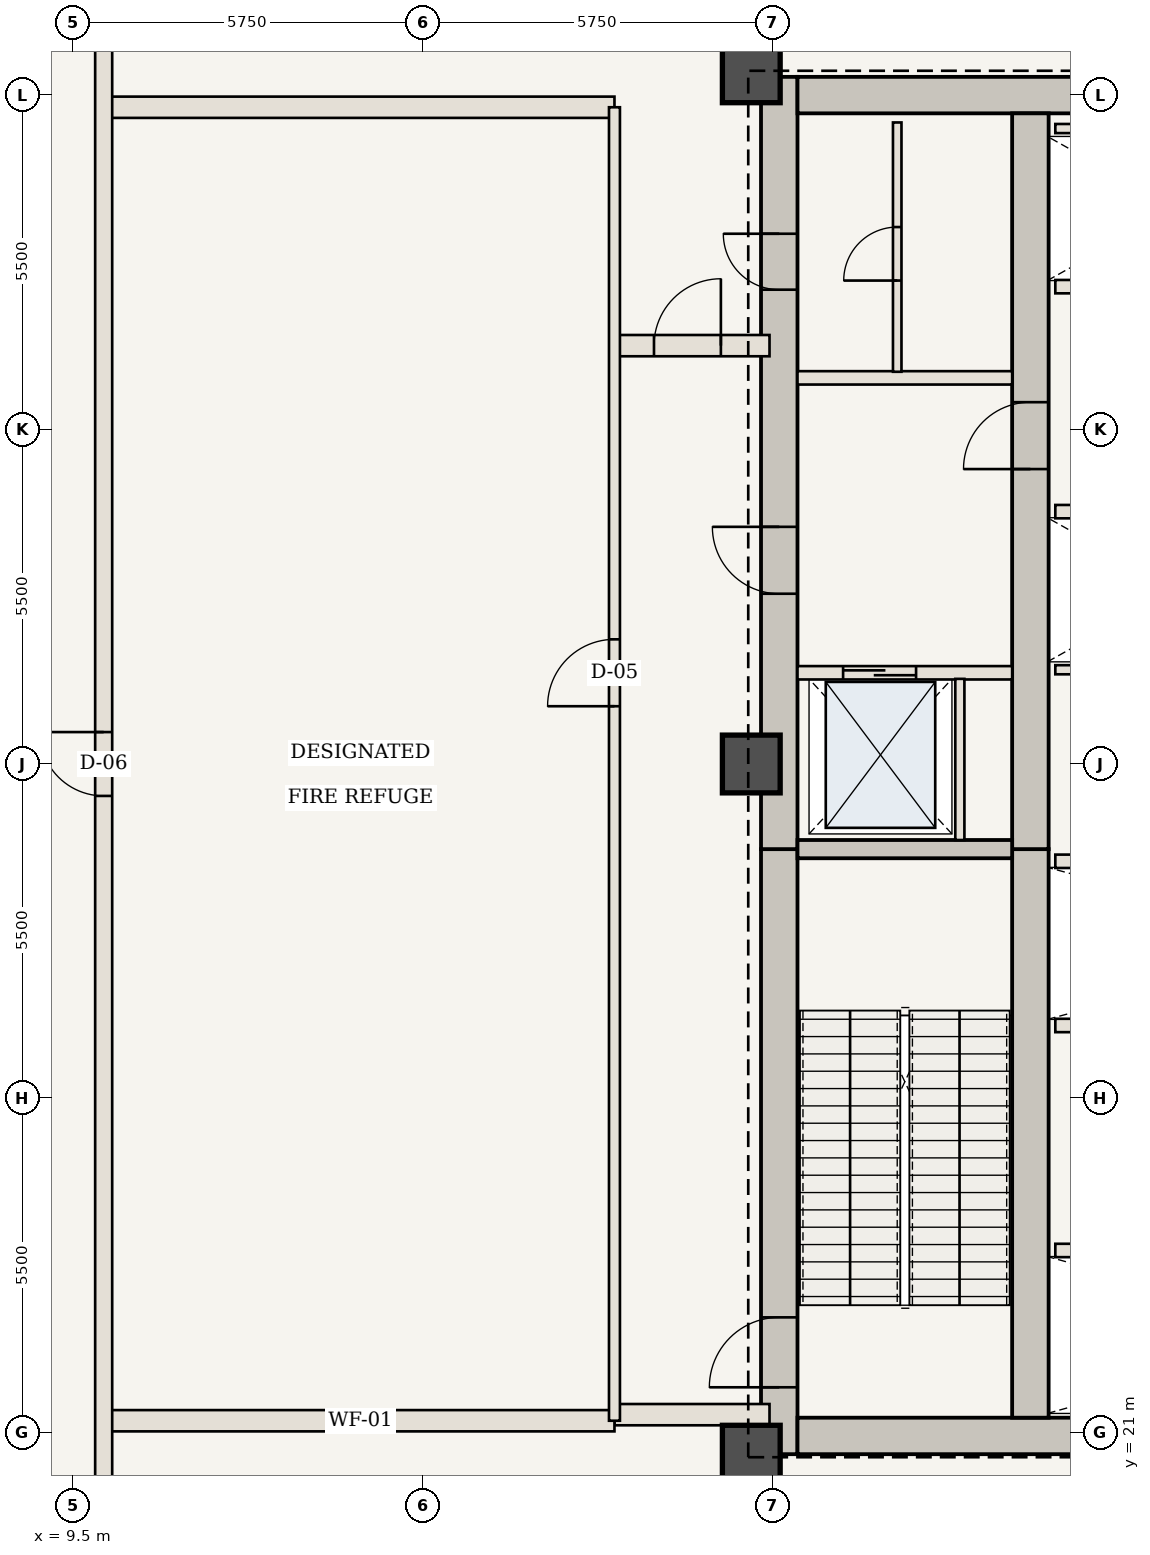
"""IFC4 building model, lengths in metres.
Left out: names, types, materials, properties, quantities, classifications, styles, units other than length and angle.
Written with IfcOpenShell. Run it as: python <this file> out.ifc"""

import sys

from ifc_helpers import new_model, si_unit, direction, frame, frame_2d, origin, origin_2d, place, context, subcontext, project, spatial, rectangle, extrude, element, fill, save


model = new_model("IFC4")
c1 = context("Model", 3, precision=1e-05, world=origin(), true_north=direction((0.0, 1.0)))
c2 = subcontext(c1, "Body", "Model", "MODEL_VIEW")
j1 = project(units=[si_unit("LENGTHUNIT", "METRE"), si_unit("PLANEANGLEUNIT", "RADIAN")], contexts=[c1])
p1 = place(None, origin())
s1 = spatial("IfcSite", under=j1, at=p1, CompositionType="ELEMENT")
p2 = place(p1, origin())
s2 = spatial("IfcBuilding", under=s1, at=p2, CompositionType="ELEMENT")
p3 = place(p2, frame((0.0, 0.0, 176.05)))
s3 = spatial("IfcBuildingStorey", under=s2, at=p3, CompositionType="ELEMENT", Elevation=176.05)
p4 = place(p3, frame((21.11, 20.65, 0.0), z_axis=(0.0, 0.0, 1.0), x_axis=(0.0, 1.0, 0.0)))
e1 = element("IfcWall", 1, at=p4, inside=s3, PredefinedType="SHEAR", context=c2, shape_type="SweptSolid", body=[
    extrude(rectangle(XDim=9.95, YDim=0.6, at=frame_2d((4.975, 0.0))), origin(), (0.0, 0.0, 1.0), 6.3),
])
p5 = place(p4, frame((1.1, 0.0, 0.0)))
e2 = element("IfcOpeningElement", 2, at=p5, cuts=e1, PredefinedType="OPENING", context=c2, shape_type="SweptSolid", body=[
    extrude(rectangle(XDim=1.15, YDim=2.15, at=frame_2d((0.575, 1.075))), frame((0.0, 0.31, 0.0), z_axis=(0.0, -1.0, 0.0), x_axis=(1.0, 0.0, 0.0)), (0.0, 0.0, 1.0), 0.62),
])
p6 = place(p3, frame((21.11, 30.6, 0.0), z_axis=(0.0, 0.0, 1.0), x_axis=(0.0, 1.0, 0.0)))
e3 = element("IfcWall", 3, at=p6, inside=s3, PredefinedType="SHEAR", context=c2, shape_type="SweptSolid", body=[
    extrude(rectangle(XDim=12.7, YDim=0.6, at=frame_2d((6.35, 0.0))), origin(), (0.0, 0.0, 1.0), 6.3),
])
p7 = place(p6, frame((4.2, 0.0, 0.0)))
e4 = element("IfcOpeningElement", 4, at=p7, cuts=e3, PredefinedType="OPENING", context=c2, shape_type="SweptSolid", body=[
    extrude(rectangle(XDim=1.1, YDim=2.15, at=frame_2d((0.55, 1.075))), frame((0.0, 0.31, 0.0), z_axis=(0.0, -1.0, 0.0), x_axis=(1.0, 0.0, 0.0)), (0.0, 0.0, 1.0), 0.62),
])
p8 = place(p6, frame((9.2, 0.0, 0.0)))
e5 = element("IfcOpeningElement", 5, at=p8, cuts=e3, PredefinedType="OPENING", context=c2, shape_type="SweptSolid", body=[
    extrude(rectangle(XDim=0.92, YDim=2.1, at=frame_2d((0.46, 1.05))), frame((0.0, 0.31, 0.0), z_axis=(0.0, -1.0, 0.0), x_axis=(1.0, 0.0, 0.0)), (0.0, 0.0, 1.0), 0.62),
])
p9 = place(p3, frame((21.41, 20.95, 0.0), z_axis=(0.0, 0.0, 1.0), x_axis=(1.0, 0.0, 0.0)))
e6 = element("IfcWall", 6, at=p9, inside=s3, PredefinedType="SHEAR", context=c2, shape_type="SweptSolid", body=[
    extrude(rectangle(XDim=13.74, YDim=0.6, at=frame_2d((6.87, 0.0))), origin(), (0.0, 0.0, 1.0), 6.3),
])
p10 = place(p3, frame((21.41, 43.0, 0.0), z_axis=(0.0, 0.0, 1.0), x_axis=(1.0, 0.0, 0.0)))
e7 = element("IfcWall", 7, at=p10, inside=s3, PredefinedType="SHEAR", context=c2, shape_type="SweptSolid", body=[
    extrude(rectangle(XDim=8.24, YDim=0.6, at=frame_2d((4.12, 0.0))), origin(), (0.0, 0.0, 1.0), 6.3),
])
p11 = place(p3, frame((25.24, 21.25, 0.0), z_axis=(0.0, 0.0, 1.0), x_axis=(0.0, 1.0, 0.0)))
e8 = element("IfcWall", 8, at=p11, inside=s3, PredefinedType="SHEAR", context=c2, shape_type="SweptSolid", body=[
    extrude(rectangle(XDim=9.35, YDim=0.6, at=frame_2d((4.675, 0.0))), origin(), (0.0, 0.0, 1.0), 6.3),
])
p12 = place(p3, frame((25.24, 30.6, 0.0), z_axis=(0.0, 0.0, 1.0), x_axis=(0.0, 1.0, 0.0)))
e9 = element("IfcWall", 9, at=p12, inside=s3, PredefinedType="SHEAR", context=c2, shape_type="SweptSolid", body=[
    extrude(rectangle(XDim=12.1, YDim=0.6, at=frame_2d((6.05, 0.0))), origin(), (0.0, 0.0, 1.0), 6.3),
])
p13 = place(p12, frame((6.25, 0.0, 0.0)))
e10 = element("IfcOpeningElement", 10, at=p13, cuts=e9, PredefinedType="OPENING", context=c2, shape_type="SweptSolid", body=[
    extrude(rectangle(XDim=1.1, YDim=2.15, at=frame_2d((0.55, 1.075))), frame((0.0, 0.31, 0.0), z_axis=(0.0, -1.0, 0.0), x_axis=(1.0, 0.0, 0.0)), (0.0, 0.0, 1.0), 0.62),
])
for number, where, z_axis, x_axis in (
    (11, (20.65, 20.65, 0.0), (0.0, 0.0, 1.0), (1.0, 0.0, 0.0)),
    (12, (20.65, 43.35, 0.0), (0.0, 0.0, 1.0), (1.0, 0.0, 0.0)),
    (13, (20.65, 32.0, 0.0), (0.0, 0.0, 1.0), (1.0, 0.0, 0.0)),
):
    element("IfcColumn", number, at=place(p3, frame(where, z_axis=z_axis, x_axis=x_axis)), inside=s3, PredefinedType="COLUMN", context=c2, shape_type="SweptSolid", body=[
        extrude(rectangle(XDim=0.95, YDim=0.95, at=origin_2d()), origin(), (0.0, 0.0, 1.0), 5.88),
    ])
p14 = place(p3, frame((21.41, 30.6, 0.0), z_axis=(0.0, 0.0, 1.0), x_axis=(1.0, 0.0, 0.0)))
e14 = element("IfcWall", 14, at=p14, inside=s3, PredefinedType="SHEAR", context=c2, shape_type="SweptSolid", body=[
    extrude(rectangle(XDim=3.53, YDim=0.3, at=frame_2d((1.765, 0.0))), origin(), (0.0, 0.0, 1.0), 5.88),
])
p15 = place(p3, frame((21.41, 33.5, 0.0), z_axis=(0.0, 0.0, 1.0), x_axis=(1.0, 0.0, 0.0)))
e15 = element("IfcWall", 15, at=p15, inside=s3, PredefinedType="STANDARD", context=c2, shape_type="SweptSolid", body=[
    extrude(rectangle(XDim=3.53, YDim=0.22, at=frame_2d((1.765, 0.0))), origin(), (0.0, 0.0, 1.0), 5.88),
])
p16 = place(p15, frame((0.75, 0.0, 0.0)))
e16 = element("IfcOpeningElement", 16, at=p16, cuts=e15, PredefinedType="OPENING", context=c2, shape_type="SweptSolid", body=[
    extrude(rectangle(XDim=1.2, YDim=2.2, at=frame_2d((0.6, 1.1))), frame((0.0, 0.12, 0.0), z_axis=(0.0, -1.0, 0.0), x_axis=(1.0, 0.0, 0.0)), (0.0, 0.0, 1.0), 0.24),
])
p17 = place(p3, frame((24.08, 30.75, 0.0), z_axis=(0.0, 0.0, 1.0), x_axis=(0.0, 1.0, 0.0)))
e17 = element("IfcWall", 17, at=p17, inside=s3, PredefinedType="STANDARD", context=c2, shape_type="SweptSolid", body=[
    extrude(rectangle(XDim=2.65, YDim=0.15, at=frame_2d((1.325, 0.0))), origin(), (0.0, 0.0, 1.0), 5.88),
])
p18 = place(p3, frame((21.41, 38.35, 0.0), z_axis=(0.0, 0.0, 1.0), x_axis=(1.0, 0.0, 0.0)))
e18 = element("IfcWall", 18, at=p18, inside=s3, PredefinedType="STANDARD", context=c2, shape_type="SweptSolid", body=[
    extrude(rectangle(XDim=3.53, YDim=0.22, at=frame_2d((1.765, 0.0))), origin(), (0.0, 0.0, 1.0), 5.88),
])
p19 = place(p3, frame((23.05, 38.45, 0.0), z_axis=(0.0, 0.0, 1.0), x_axis=(0.0, 1.0, 0.0)))
e19 = element("IfcWall", 19, at=p19, inside=s3, PredefinedType="STANDARD", context=c2, shape_type="SweptSolid", body=[
    extrude(rectangle(XDim=4.1, YDim=0.14, at=frame_2d((2.05, 0.0))), origin(), (0.0, 0.0, 1.0), 5.88),
])
p20 = place(p19, frame((1.5, 0.0, 0.0)))
e20 = element("IfcOpeningElement", 20, at=p20, cuts=e19, PredefinedType="OPENING", context=c2, shape_type="SweptSolid", body=[
    extrude(rectangle(XDim=0.88, YDim=2.1, at=frame_2d((0.44, 1.05))), frame((0.0, 0.08, 0.0), z_axis=(0.0, -1.0, 0.0), x_axis=(1.0, 0.0, 0.0)), (0.0, 0.0, 1.0), 0.16),
])
for number, where, z_axis, x_axis in (
    (21, (25.65, 24.0, 0.0), (0.0, 0.0, 1.0), (1.0, 0.0, 0.0)),
    (22, (25.65, 27.7, 0.0), (0.0, 0.0, 1.0), (1.0, 0.0, 0.0)),
    (23, (25.65, 30.4, 0.0), (0.0, 0.0, 1.0), (1.0, 0.0, 0.0)),
):
    element("IfcWall", number, at=place(p3, frame(where, z_axis=z_axis, x_axis=x_axis)), inside=s3, PredefinedType="STANDARD", context=c2, shape_type="SweptSolid", body=[
        extrude(rectangle(XDim=9.25, YDim=0.22, at=frame_2d((4.625, 0.0))), origin(), (0.0, 0.0, 1.0), 5.88),
    ])
p21 = place(p3, frame((25.65, 36.15, 0.0), z_axis=(0.0, 0.0, 1.0), x_axis=(1.0, 0.0, 0.0)))
e24 = element("IfcWall", 24, at=p21, inside=s3, PredefinedType="STANDARD", context=c2, shape_type="SweptSolid", body=[
    extrude(rectangle(XDim=4.3, YDim=0.22, at=frame_2d((2.15, 0.0))), origin(), (0.0, 0.0, 1.0), 5.88),
])
p22 = place(p3, frame((25.65, 33.55, 0.0), z_axis=(0.0, 0.0, 1.0), x_axis=(1.0, 0.0, 0.0)))
e25 = element("IfcWall", 25, at=p22, inside=s3, PredefinedType="STANDARD", context=c2, shape_type="SweptSolid", body=[
    extrude(rectangle(XDim=4.2, YDim=0.15, at=frame_2d((2.1, 0.0))), origin(), (0.0, 0.0, 1.0), 5.88),
])
p23 = place(p3, frame((25.65, 39.85, 0.0), z_axis=(0.0, 0.0, 1.0), x_axis=(1.0, 0.0, 0.0)))
e26 = element("IfcWall", 26, at=p23, inside=s3, PredefinedType="STANDARD", context=c2, shape_type="SweptSolid", body=[
    extrude(rectangle(XDim=4.3, YDim=0.22, at=frame_2d((2.15, 0.0))), origin(), (0.0, 0.0, 1.0), 5.88),
])
p24 = place(p3, frame((25.65, 42.45, 0.0), z_axis=(0.0, 0.0, 1.0), x_axis=(1.0, 0.0, 0.0)))
e27 = element("IfcWall", 27, at=p24, inside=s3, PredefinedType="STANDARD", context=c2, shape_type="SweptSolid", body=[
    extrude(rectangle(XDim=4.2, YDim=0.15, at=frame_2d((2.1, 0.0))), origin(), (0.0, 0.0, 1.0), 5.88),
])
p25 = place(p3, frame((18.4, 21.3, 0.0), z_axis=(0.0, 0.0, 1.0), x_axis=(1.0, 0.0, 0.0)))
e28 = element("IfcWall", 28, at=p25, inside=s3, PredefinedType="STANDARD", context=c2, shape_type="SweptSolid", body=[
    extrude(rectangle(XDim=2.55, YDim=0.35, at=frame_2d((1.275, 0.0))), origin(), (0.0, 0.0, 1.0), 3.908),
])
p26 = place(p3, frame((18.4, 38.88, 0.0), z_axis=(0.0, 0.0, 1.0), x_axis=(1.0, 0.0, 0.0)))
e29 = element("IfcWall", 29, at=p26, inside=s3, PredefinedType="STANDARD", context=c2, shape_type="SweptSolid", body=[
    extrude(rectangle(XDim=2.55, YDim=0.35, at=frame_2d((1.275, 0.0))), origin(), (0.0, 0.0, 1.0), 5.88),
])
p27 = place(p26, frame((0.65, 0.0, 0.0)))
e30 = element("IfcOpeningElement", 30, at=p27, cuts=e29, PredefinedType="OPENING", context=c2, shape_type="SweptSolid", body=[
    extrude(rectangle(XDim=1.1, YDim=2.15, at=frame_2d((0.55, 1.075))), frame((0.0, 0.185, 0.0), z_axis=(0.0, -1.0, 0.0), x_axis=(1.0, 0.0, 0.0)), (0.0, 0.0, 1.0), 0.37),
])
for number, where, z_axis, x_axis in (
    (31, (10.05, 21.2, 0.0), (0.0, 0.0, 1.0), (1.0, 0.0, 0.0)),
    (32, (10.05, 42.8, 0.0), (0.0, 0.0, 1.0), (1.0, 0.0, 0.0)),
):
    element("IfcWall", number, at=place(p3, frame(where, z_axis=z_axis, x_axis=x_axis)), inside=s3, PredefinedType="STANDARD", context=c2, shape_type="SweptSolid", body=[
        extrude(rectangle(XDim=8.35, YDim=0.35, at=frame_2d((4.175, 0.0))), origin(), (0.0, 0.0, 1.0), 3.908),
    ])
p28 = place(p3, frame((18.4, 21.2, 0.0), z_axis=(0.0, 0.0, 1.0), x_axis=(0.0, 1.0, 0.0)))
e33 = element("IfcWall", 33, at=p28, inside=s3, PredefinedType="STANDARD", context=c2, shape_type="SweptSolid", body=[
    extrude(rectangle(XDim=21.6, YDim=0.18, at=frame_2d((10.8, 0.0))), origin(), (0.0, 0.0, 1.0), 5.88),
])
p29 = place(p28, frame((11.75, 0.0, 0.0)))
e34 = element("IfcOpeningElement", 34, at=p29, cuts=e33, PredefinedType="OPENING", context=c2, shape_type="SweptSolid", body=[
    extrude(rectangle(XDim=1.1, YDim=2.15, at=frame_2d((0.55, 1.075))), frame((0.0, 0.1, 0.0), z_axis=(0.0, -1.0, 0.0), x_axis=(1.0, 0.0, 0.0)), (0.0, 0.0, 1.0), 0.2),
])
p30 = place(p3, frame((10.0, 10.0, 0.0), z_axis=(0.0, 0.0, 1.0), x_axis=(0.0, 1.0, 0.0)))
e35 = element("IfcWall", 35, at=p30, inside=s3, PredefinedType="USERDEFINED", context=c2, shape_type="SweptSolid", body=[
    extrude(rectangle(XDim=44.0, YDim=0.28, at=frame_2d((22.0, 0.0))), origin(), (0.0, 0.0, 1.0), 3.88),
])
p31 = place(p30, frame((21.475, 0.0, 0.0)))
e36 = element("IfcOpeningElement", 36, at=p31, cuts=e35, PredefinedType="OPENING", context=c2, shape_type="SweptSolid", body=[
    extrude(rectangle(XDim=1.05, YDim=2.2, at=frame_2d((0.525, 1.1))), frame((0.0, 0.15, 0.0), z_axis=(0.0, -1.0, 0.0), x_axis=(1.0, 0.0, 0.0)), (0.0, 0.0, 1.0), 0.3),
])
p32 = place(p5, origin())
e37 = element("IfcDoor", 37, at=p32, inside=s3, OperationType="SINGLE_SWING_LEFT", PredefinedType="DOOR", context=c2, shape_type="SweptSolid", body=[
    extrude(rectangle(XDim=1.15, YDim=2.15, at=frame_2d((0.575, 1.075))), frame((0.0, 0.025, 0.0), z_axis=(0.0, -1.0, 0.0), x_axis=(1.0, 0.0, 0.0)), (0.0, 0.0, 1.0), 0.05),
])
fill(e2, e37)
p33 = place(p7, origin())
e38 = element("IfcDoor", 38, at=p33, inside=s3, OperationType="SINGLE_SWING_RIGHT", PredefinedType="DOOR", context=c2, shape_type="SweptSolid", body=[
    extrude(rectangle(XDim=1.1, YDim=2.15, at=frame_2d((0.55, 1.075))), frame((0.0, 0.025, 0.0), z_axis=(0.0, -1.0, 0.0), x_axis=(1.0, 0.0, 0.0)), (0.0, 0.0, 1.0), 0.05),
])
fill(e4, e38)
p34 = place(p13, origin())
e39 = element("IfcDoor", 39, at=p34, inside=s3, OperationType="SINGLE_SWING_LEFT", PredefinedType="DOOR", context=c2, shape_type="SweptSolid", body=[
    extrude(rectangle(XDim=1.1, YDim=2.15, at=frame_2d((0.55, 1.075))), frame((0.0, 0.025, 0.0), z_axis=(0.0, -1.0, 0.0), x_axis=(1.0, 0.0, 0.0)), (0.0, 0.0, 1.0), 0.05),
])
fill(e10, e39)
p35 = place(p8, origin())
e40 = element("IfcDoor", 40, at=p35, inside=s3, OperationType="SINGLE_SWING_RIGHT", PredefinedType="DOOR", context=c2, shape_type="SweptSolid", body=[
    extrude(rectangle(XDim=0.92, YDim=2.1, at=frame_2d((0.46, 1.05))), frame((0.0, 0.025, 0.0), z_axis=(0.0, -1.0, 0.0), x_axis=(1.0, 0.0, 0.0)), (0.0, 0.0, 1.0), 0.05),
])
fill(e5, e40)
p36 = place(p16, origin())
e41 = element("IfcDoor", 41, at=p36, inside=s3, OperationType="DOUBLE_DOOR_SLIDING", PredefinedType="DOOR", context=c2, shape_type="SweptSolid", body=[
    extrude(rectangle(XDim=1.2, YDim=2.2, at=frame_2d((0.6, 1.1))), frame((0.0, 0.025, 0.0), z_axis=(0.0, -1.0, 0.0), x_axis=(1.0, 0.0, 0.0)), (0.0, 0.0, 1.0), 0.05),
])
fill(e16, e41)
p37 = place(p20, origin())
e42 = element("IfcDoor", 42, at=p37, inside=s3, OperationType="SINGLE_SWING_LEFT", PredefinedType="DOOR", context=c2, shape_type="SweptSolid", body=[
    extrude(rectangle(XDim=0.88, YDim=2.1, at=frame_2d((0.44, 1.05))), frame((0.0, 0.025, 0.0), z_axis=(0.0, -1.0, 0.0), x_axis=(1.0, 0.0, 0.0)), (0.0, 0.0, 1.0), 0.05),
])
fill(e20, e42)
p38 = place(p27, origin())
e43 = element("IfcDoor", 43, at=p38, inside=s3, OperationType="SINGLE_SWING_RIGHT", PredefinedType="DOOR", context=c2, shape_type="SweptSolid", body=[
    extrude(rectangle(XDim=1.1, YDim=2.15, at=frame_2d((0.55, 1.075))), frame((0.0, 0.025, 0.0), z_axis=(0.0, -1.0, 0.0), x_axis=(1.0, 0.0, 0.0)), (0.0, 0.0, 1.0), 0.05),
])
fill(e30, e43)
p39 = place(p29, origin())
e44 = element("IfcDoor", 44, at=p39, inside=s3, OperationType="SINGLE_SWING_LEFT", PredefinedType="DOOR", context=c2, shape_type="SweptSolid", body=[
    extrude(rectangle(XDim=1.1, YDim=2.15, at=frame_2d((0.55, 1.075))), frame((0.0, 0.025, 0.0), z_axis=(0.0, -1.0, 0.0), x_axis=(1.0, 0.0, 0.0)), (0.0, 0.0, 1.0), 0.05),
])
fill(e34, e44)
p40 = place(p31, origin())
e45 = element("IfcDoor", 45, at=p40, inside=s3, OperationType="SINGLE_SWING_RIGHT", PredefinedType="DOOR", context=c2, shape_type="SweptSolid", body=[
    extrude(rectangle(XDim=1.05, YDim=2.2, at=frame_2d((0.525, 1.1))), frame((0.0, 0.025, 0.0), z_axis=(0.0, -1.0, 0.0), x_axis=(1.0, 0.0, 0.0)), (0.0, 0.0, 1.0), 0.05),
])
fill(e36, e45)
save(model, sys.argv[1])
